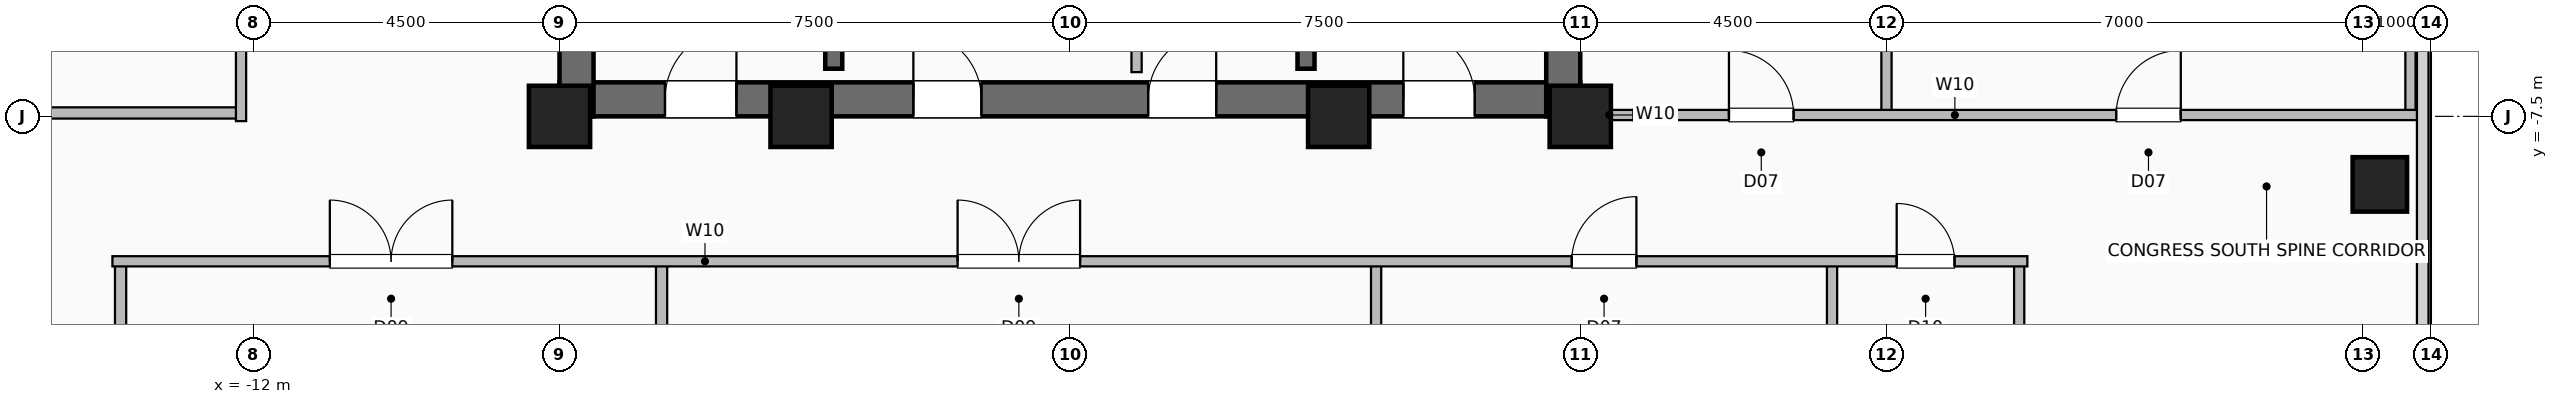
"""IFC4 building model, lengths in metres.
Left out: names, types, materials, properties, quantities, classifications, styles, units other than length and angle.
Written with IfcOpenShell. Run it as: python <this file> out.ifc"""

import sys

from ifc_helpers import new_model, si_unit, direction, frame, frame_2d, origin, origin_2d, place, context, subcontext, project, spatial, rectangle, hollow_rectangle, extrude, element, fill, save


model = new_model("IFC4")
c1 = context("Model", 3, precision=1e-05, world=origin(), true_north=direction((0.0, 1.0)))
c2 = subcontext(c1, "Body", "Model", "MODEL_VIEW")
j1 = project(units=[si_unit("LENGTHUNIT", "METRE"), si_unit("PLANEANGLEUNIT", "RADIAN")], contexts=[c1])
p1 = place(None, origin())
s1 = spatial("IfcSite", under=j1, at=p1, CompositionType="ELEMENT")
p2 = place(p1, origin())
s2 = spatial("IfcBuilding", under=s1, at=p2, CompositionType="ELEMENT")
p3 = place(p2, frame((0.0, 0.0, 166.2)))
s3 = spatial("IfcBuildingStorey", under=s2, at=p3, CompositionType="ELEMENT", Elevation=166.2)
for number, where, z_axis, x_axis in (
    (1, (-7.5, -7.5, 0.0), (0.0, 0.0, 1.0), (1.0, 0.0, 0.0)),
    (2, (-3.95, -7.5, 0.0), (0.0, 0.0, 1.0), (1.0, 0.0, 0.0)),
    (3, (3.95, -7.5, 0.0), (0.0, 0.0, 1.0), (1.0, 0.0, 0.0)),
    (4, (7.5, -7.5, 0.0), (0.0, 0.0, 1.0), (1.0, 0.0, 0.0)),
):
    element("IfcColumn", number, at=place(p3, frame(where, z_axis=z_axis, x_axis=x_axis)), inside=s3, PredefinedType="COLUMN", context=c2, shape_type="SweptSolid", body=[
        extrude(hollow_rectangle(XDim=0.9, YDim=0.9, WallThickness=0.045, at=origin_2d()), origin(), (0.0, 0.0, 1.0), 3.6),
    ])
p4 = place(p3, frame((19.25, -8.5, -0.4), z_axis=(0.0, 0.0, 1.0), x_axis=(1.0, 0.0, 0.0)))
e5 = element("IfcColumn", 5, at=p4, inside=s3, PredefinedType="COLUMN", context=c2, shape_type="SweptSolid", body=[
    extrude(hollow_rectangle(XDim=0.8, YDim=0.8, WallThickness=0.04, at=origin_2d()), origin(), (0.0, 0.0, 1.0), 4.0),
])
p5 = place(p3, frame((-7.5, -7.25, 0.0), z_axis=(0.0, 0.0, 1.0), x_axis=(1.0, 0.0, 0.0)))
e6 = element("IfcWall", 6, at=p5, inside=s3, PredefinedType="SHEAR", context=c2, shape_type="SweptSolid", body=[
    extrude(rectangle(XDim=15.0, YDim=0.5, at=frame_2d((7.5, 0.0))), origin(), (0.0, 0.0, 1.0), 3.36),
])
p6 = place(p5, frame((1.55, 0.0, 0.0)))
e7 = element("IfcOpeningElement", 7, at=p6, cuts=e6, PredefinedType="OPENING", context=c2, shape_type="SweptSolid", body=[
    extrude(rectangle(XDim=1.05, YDim=2.08, at=frame_2d((0.525, 1.04))), frame((0.0, 0.26, 0.0), z_axis=(0.0, -1.0, 0.0), x_axis=(1.0, 0.0, 0.0)), (0.0, 0.0, 1.0), 0.52),
])
p7 = place(p5, frame((12.4, 0.0, 0.0)))
e8 = element("IfcOpeningElement", 8, at=p7, cuts=e6, PredefinedType="OPENING", context=c2, shape_type="SweptSolid", body=[
    extrude(rectangle(XDim=1.05, YDim=2.08, at=frame_2d((0.525, 1.04))), frame((0.0, 0.26, 0.0), z_axis=(0.0, -1.0, 0.0), x_axis=(1.0, 0.0, 0.0)), (0.0, 0.0, 1.0), 0.52),
])
p8 = place(p5, frame((5.2, 0.0, 0.0)))
e9 = element("IfcOpeningElement", 9, at=p8, cuts=e6, PredefinedType="OPENING", context=c2, shape_type="SweptSolid", body=[
    extrude(rectangle(XDim=1.0, YDim=2.08, at=frame_2d((0.5, 1.04))), frame((0.0, 0.26, 0.0), z_axis=(0.0, -1.0, 0.0), x_axis=(1.0, 0.0, 0.0)), (0.0, 0.0, 1.0), 0.52),
])
p9 = place(p5, frame((8.65, 0.0, 0.0)))
e10 = element("IfcOpeningElement", 10, at=p9, cuts=e6, PredefinedType="OPENING", context=c2, shape_type="SweptSolid", body=[
    extrude(rectangle(XDim=1.0, YDim=2.08, at=frame_2d((0.5, 1.04))), frame((0.0, 0.26, 0.0), z_axis=(0.0, -1.0, 0.0), x_axis=(1.0, 0.0, 0.0)), (0.0, 0.0, 1.0), 0.52),
])
p10 = place(p3, frame((-7.25, -7.5, 0.0), z_axis=(0.0, 0.0, 1.0), x_axis=(0.0, 1.0, 0.0)))
e11 = element("IfcWall", 11, at=p10, inside=s3, PredefinedType="SHEAR", context=c2, shape_type="SweptSolid", body=[
    extrude(rectangle(XDim=15.0, YDim=0.5, at=frame_2d((7.5, 0.0))), origin(), (0.0, 0.0, 1.0), 3.36),
])
p11 = place(p10, frame((9.5, 0.0, 0.0)))
e12 = element("IfcOpeningElement", 12, at=p11, cuts=e11, PredefinedType="OPENING", context=c2, shape_type="SweptSolid", body=[
    extrude(rectangle(XDim=1.0, YDim=2.08, at=frame_2d((0.5, 1.04))), frame((0.0, 0.26, 0.0), z_axis=(0.0, -1.0, 0.0), x_axis=(1.0, 0.0, 0.0)), (0.0, 0.0, 1.0), 0.52),
])
p12 = place(p3, frame((7.25, -7.5, 0.0), z_axis=(0.0, 0.0, 1.0), x_axis=(0.0, 1.0, 0.0)))
e13 = element("IfcWall", 13, at=p12, inside=s3, PredefinedType="SHEAR", context=c2, shape_type="SweptSolid", body=[
    extrude(rectangle(XDim=15.0, YDim=0.5, at=frame_2d((7.5, 0.0))), origin(), (0.0, 0.0, 1.0), 3.36),
])
for number, where, z_axis, x_axis in (
    (14, (-3.47, -6.8, 0.0), (0.0, 0.0, 1.0), (0.0, 1.0, 0.0)),
    (15, (3.47, -6.8, 0.0), (0.0, 0.0, 1.0), (0.0, 1.0, 0.0)),
):
    element("IfcWall", number, at=place(p3, frame(where, z_axis=z_axis, x_axis=x_axis)), inside=s3, PredefinedType="SHEAR", context=c2, shape_type="SweptSolid", body=[
        extrude(rectangle(XDim=7.72, YDim=0.25, at=frame_2d((3.86, 0.0))), origin(), (0.0, 0.0, 1.0), 3.36),
    ])
p13 = place(p3, frame((0.98, -6.85, 0.0), z_axis=(0.0, 0.0, 1.0), x_axis=(0.0, 1.0, 0.0)))
e16 = element("IfcWall", 16, at=p13, inside=s3, PredefinedType="PARTITIONING", context=c2, shape_type="SweptSolid", body=[
    extrude(rectangle(XDim=4.42, YDim=0.15, at=frame_2d((2.21, 0.0))), origin(), (0.0, 0.0, 1.0), 3.36),
])
for number, where, z_axis, x_axis in (
    (17, (-13.95, -19.82, 0.0), (0.0, 0.0, 1.0), (0.0, 1.0, 0.0)),
    (18, (-6.0, -19.82, 0.0), (0.0, 0.0, 1.0), (0.0, 1.0, 0.0)),
):
    element("IfcWall", number, at=place(p3, frame(where, z_axis=z_axis, x_axis=x_axis)), inside=s3, PredefinedType="PLUMBINGWALL", context=c2, shape_type="SweptSolid", body=[
        extrude(rectangle(XDim=10.19, YDim=0.165, at=frame_2d((5.095, 0.0))), origin(), (0.0, 0.0, 1.0), 3.36),
    ])
for number, where, z_axis, x_axis in (
    (19, (4.5, -19.82, 0.0), (0.0, 0.0, 1.0), (0.0, 1.0, 0.0)),
    (20, (11.2, -19.82, 0.0), (0.0, 0.0, 1.0), (0.0, 1.0, 0.0)),
    (21, (13.95, -19.82, 0.0), (0.0, 0.0, 1.0), (0.0, 1.0, 0.0)),
):
    element("IfcWall", number, at=place(p3, frame(where, z_axis=z_axis, x_axis=x_axis)), inside=s3, PredefinedType="PARTITIONING", context=c2, shape_type="SweptSolid", body=[
        extrude(rectangle(XDim=10.19, YDim=0.15, at=frame_2d((5.095, 0.0))), origin(), (0.0, 0.0, 1.0), 3.36),
    ])
p14 = place(p3, frame((-14.07, -9.63, 0.0), z_axis=(0.0, 0.0, 1.0), x_axis=(1.0, 0.0, 0.0)))
e22 = element("IfcWall", 22, at=p14, inside=s3, PredefinedType="PARTITIONING", context=c2, shape_type="SweptSolid", body=[
    extrude(rectangle(XDim=28.14, YDim=0.15, at=frame_2d((14.07, 0.0))), origin(), (0.0, 0.0, 1.0), 3.36),
])
p15 = place(p14, frame((3.195, 0.0, 0.0)))
e23 = element("IfcOpeningElement", 23, at=p15, cuts=e22, PredefinedType="OPENING", context=c2, shape_type="SweptSolid", body=[
    extrude(rectangle(XDim=1.8, YDim=2.08, at=frame_2d((0.9, 1.04))), frame((0.0, 0.085, 0.0), z_axis=(0.0, -1.0, 0.0), x_axis=(1.0, 0.0, 0.0)), (0.0, 0.0, 1.0), 0.17),
])
p16 = place(p14, frame((12.42, 0.0, 0.0)))
e24 = element("IfcOpeningElement", 24, at=p16, cuts=e22, PredefinedType="OPENING", context=c2, shape_type="SweptSolid", body=[
    extrude(rectangle(XDim=1.8, YDim=2.08, at=frame_2d((0.9, 1.04))), frame((0.0, 0.085, 0.0), z_axis=(0.0, -1.0, 0.0), x_axis=(1.0, 0.0, 0.0)), (0.0, 0.0, 1.0), 0.17),
])
p17 = place(p14, frame((21.445, 0.0, 0.0)))
e25 = element("IfcOpeningElement", 25, at=p17, cuts=e22, PredefinedType="OPENING", context=c2, shape_type="SweptSolid", body=[
    extrude(rectangle(XDim=0.95, YDim=2.06, at=frame_2d((0.475, 1.03))), frame((0.0, 0.085, 0.0), z_axis=(0.0, -1.0, 0.0), x_axis=(1.0, 0.0, 0.0)), (0.0, 0.0, 1.0), 0.17),
])
p18 = place(p14, frame((26.22, 0.0, 0.0)))
e26 = element("IfcOpeningElement", 26, at=p18, cuts=e22, PredefinedType="OPENING", context=c2, shape_type="SweptSolid", body=[
    extrude(rectangle(XDim=0.85, YDim=2.05, at=frame_2d((0.425, 1.025))), frame((0.0, 0.085, 0.0), z_axis=(0.0, -1.0, 0.0), x_axis=(1.0, 0.0, 0.0)), (0.0, 0.0, 1.0), 0.17),
])
p19 = place(p3, frame((-19.82, -7.45, 0.0), z_axis=(0.0, 0.0, 1.0), x_axis=(1.0, 0.0, 0.0)))
e27 = element("IfcWall", 27, at=p19, inside=s3, PredefinedType="PLUMBINGWALL", context=c2, shape_type="SweptSolid", body=[
    extrude(rectangle(XDim=7.64, YDim=0.165, at=frame_2d((3.82, 0.0))), origin(), (0.0, 0.0, 1.0), 3.36),
])
p20 = place(p3, frame((-12.18, -7.57, 0.0), z_axis=(0.0, 0.0, 1.0), x_axis=(0.0, 1.0, 0.0)))
e28 = element("IfcWall", 28, at=p20, inside=s3, PredefinedType="PARTITIONING", context=c2, shape_type="SweptSolid", body=[
    extrude(rectangle(XDim=15.14, YDim=0.15, at=frame_2d((7.57, 0.0))), origin(), (0.0, 0.0, 1.0), 3.36),
])
p21 = place(p20, frame((5.045, 0.0, 0.0)))
e29 = element("IfcOpeningElement", 29, at=p21, cuts=e28, PredefinedType="OPENING", context=c2, shape_type="SweptSolid", body=[
    extrude(rectangle(XDim=1.8, YDim=2.08, at=frame_2d((0.9, 1.04))), frame((0.0, 0.085, 0.0), z_axis=(0.0, -1.0, 0.0), x_axis=(1.0, 0.0, 0.0)), (0.0, 0.0, 1.0), 0.17),
])
p22 = place(p20, frame((12.97, 0.0, 0.0)))
e30 = element("IfcOpeningElement", 30, at=p22, cuts=e28, PredefinedType="OPENING", context=c2, shape_type="SweptSolid", body=[
    extrude(rectangle(XDim=0.85, YDim=2.05, at=frame_2d((0.425, 1.025))), frame((0.0, 0.085, 0.0), z_axis=(0.0, -1.0, 0.0), x_axis=(1.0, 0.0, 0.0)), (0.0, 0.0, 1.0), 0.17),
])
p23 = place(p3, frame((7.45, -7.48, 0.0), z_axis=(0.0, 0.0, 1.0), x_axis=(1.0, 0.0, 0.0)))
e31 = element("IfcWall", 31, at=p23, inside=s3, PredefinedType="PARTITIONING", context=c2, shape_type="SweptSolid", body=[
    extrude(rectangle(XDim=0.95, YDim=0.15, at=frame_2d((0.475, 0.0))), origin(), (0.0, 0.0, 1.0), 3.36),
])
for number, where, z_axis, x_axis in (
    (32, (12.0, -7.48, 0.0), (0.0, 0.0, 1.0), (0.0, 1.0, 0.0)),
    (33, (19.7, -7.48, 0.0), (0.0, 0.0, 1.0), (0.0, 1.0, 0.0)),
):
    element("IfcWall", number, at=place(p3, frame(where, z_axis=z_axis, x_axis=x_axis)), inside=s3, PredefinedType="PARTITIONING", context=c2, shape_type="SweptSolid", body=[
        extrude(rectangle(XDim=14.88, YDim=0.15, at=frame_2d((7.44, 0.0))), origin(), (0.0, 0.0, 1.0), 3.36),
    ])
p24 = place(p3, frame((8.28, -7.48, 0.0), z_axis=(0.0, 0.0, 1.0), x_axis=(1.0, 0.0, 0.0)))
e34 = element("IfcWall", 34, at=p24, inside=s3, PredefinedType="PARTITIONING", context=c2, shape_type="SweptSolid", body=[
    extrude(rectangle(XDim=11.54, YDim=0.15, at=frame_2d((5.77, 0.0))), origin(), (0.0, 0.0, 1.0), 3.36),
])
p25 = place(p24, frame((1.405, 0.0, 0.0)))
e35 = element("IfcOpeningElement", 35, at=p25, cuts=e34, PredefinedType="OPENING", context=c2, shape_type="SweptSolid", body=[
    extrude(rectangle(XDim=0.95, YDim=2.06, at=frame_2d((0.475, 1.03))), frame((0.0, 0.085, 0.0), z_axis=(0.0, -1.0, 0.0), x_axis=(1.0, 0.0, 0.0)), (0.0, 0.0, 1.0), 0.17),
])
p26 = place(p24, frame((7.095, 0.0, 0.0)))
e36 = element("IfcOpeningElement", 36, at=p26, cuts=e34, PredefinedType="OPENING", context=c2, shape_type="SweptSolid", body=[
    extrude(rectangle(XDim=0.95, YDim=2.06, at=frame_2d((0.475, 1.03))), frame((0.0, 0.085, 0.0), z_axis=(0.0, -1.0, 0.0), x_axis=(1.0, 0.0, 0.0)), (0.0, 0.0, 1.0), 0.17),
])
p27 = place(p6, origin())
e37 = element("IfcDoor", 37, at=p27, inside=s3, OperationType="SINGLE_SWING_RIGHT", PredefinedType="DOOR", context=c2, shape_type="SweptSolid", body=[
    extrude(rectangle(XDim=1.05, YDim=2.08, at=frame_2d((0.525, 1.04))), frame((0.0, 0.025, 0.0), z_axis=(0.0, -1.0, 0.0), x_axis=(1.0, 0.0, 0.0)), (0.0, 0.0, 1.0), 0.05),
])
fill(e7, e37)
p28 = place(p7, origin())
e38 = element("IfcDoor", 38, at=p28, inside=s3, OperationType="SINGLE_SWING_LEFT", PredefinedType="DOOR", context=c2, shape_type="SweptSolid", body=[
    extrude(rectangle(XDim=1.05, YDim=2.08, at=frame_2d((0.525, 1.04))), frame((0.0, 0.025, 0.0), z_axis=(0.0, -1.0, 0.0), x_axis=(1.0, 0.0, 0.0)), (0.0, 0.0, 1.0), 0.05),
])
fill(e8, e38)
p29 = place(p8, origin())
e39 = element("IfcDoor", 39, at=p29, inside=s3, OperationType="SINGLE_SWING_LEFT", PredefinedType="DOOR", context=c2, shape_type="SweptSolid", body=[
    extrude(rectangle(XDim=1.0, YDim=2.08, at=frame_2d((0.5, 1.04))), frame((0.0, 0.025, 0.0), z_axis=(0.0, -1.0, 0.0), x_axis=(1.0, 0.0, 0.0)), (0.0, 0.0, 1.0), 0.05),
])
fill(e9, e39)
p30 = place(p9, origin())
e40 = element("IfcDoor", 40, at=p30, inside=s3, OperationType="SINGLE_SWING_RIGHT", PredefinedType="DOOR", context=c2, shape_type="SweptSolid", body=[
    extrude(rectangle(XDim=1.0, YDim=2.08, at=frame_2d((0.5, 1.04))), frame((0.0, 0.025, 0.0), z_axis=(0.0, -1.0, 0.0), x_axis=(1.0, 0.0, 0.0)), (0.0, 0.0, 1.0), 0.05),
])
fill(e10, e40)
p31 = place(p15, origin())
e41 = element("IfcDoor", 41, at=p31, inside=s3, OperationType="DOUBLE_DOOR_SINGLE_SWING", PredefinedType="DOOR", context=c2, shape_type="SweptSolid", body=[
    extrude(rectangle(XDim=1.8, YDim=2.08, at=frame_2d((0.9, 1.04))), frame((0.0, 0.025, 0.0), z_axis=(0.0, -1.0, 0.0), x_axis=(1.0, 0.0, 0.0)), (0.0, 0.0, 1.0), 0.05),
])
fill(e23, e41)
p32 = place(p16, origin())
e42 = element("IfcDoor", 42, at=p32, inside=s3, OperationType="DOUBLE_DOOR_SINGLE_SWING", PredefinedType="DOOR", context=c2, shape_type="SweptSolid", body=[
    extrude(rectangle(XDim=1.8, YDim=2.08, at=frame_2d((0.9, 1.04))), frame((0.0, 0.025, 0.0), z_axis=(0.0, -1.0, 0.0), x_axis=(1.0, 0.0, 0.0)), (0.0, 0.0, 1.0), 0.05),
])
fill(e24, e42)
p33 = place(p17, origin())
e43 = element("IfcDoor", 43, at=p33, inside=s3, OperationType="SINGLE_SWING_RIGHT", PredefinedType="DOOR", context=c2, shape_type="SweptSolid", body=[
    extrude(rectangle(XDim=0.95, YDim=2.06, at=frame_2d((0.475, 1.03))), frame((0.0, 0.025, 0.0), z_axis=(0.0, -1.0, 0.0), x_axis=(1.0, 0.0, 0.0)), (0.0, 0.0, 1.0), 0.05),
])
fill(e25, e43)
p34 = place(p18, origin())
e44 = element("IfcDoor", 44, at=p34, inside=s3, OperationType="SINGLE_SWING_LEFT", PredefinedType="DOOR", context=c2, shape_type="SweptSolid", body=[
    extrude(rectangle(XDim=0.85, YDim=2.05, at=frame_2d((0.425, 1.025))), frame((0.0, 0.025, 0.0), z_axis=(0.0, -1.0, 0.0), x_axis=(1.0, 0.0, 0.0)), (0.0, 0.0, 1.0), 0.05),
])
fill(e26, e44)
p35 = place(p25, origin())
e45 = element("IfcDoor", 45, at=p35, inside=s3, OperationType="SINGLE_SWING_LEFT", PredefinedType="DOOR", context=c2, shape_type="SweptSolid", body=[
    extrude(rectangle(XDim=0.95, YDim=2.06, at=frame_2d((0.475, 1.03))), frame((0.0, 0.025, 0.0), z_axis=(0.0, -1.0, 0.0), x_axis=(1.0, 0.0, 0.0)), (0.0, 0.0, 1.0), 0.05),
])
fill(e35, e45)
p36 = place(p26, origin())
e46 = element("IfcDoor", 46, at=p36, inside=s3, OperationType="SINGLE_SWING_RIGHT", PredefinedType="DOOR", context=c2, shape_type="SweptSolid", body=[
    extrude(rectangle(XDim=0.95, YDim=2.06, at=frame_2d((0.475, 1.03))), frame((0.0, 0.025, 0.0), z_axis=(0.0, -1.0, 0.0), x_axis=(1.0, 0.0, 0.0)), (0.0, 0.0, 1.0), 0.05),
])
fill(e36, e46)
save(model, sys.argv[1])
